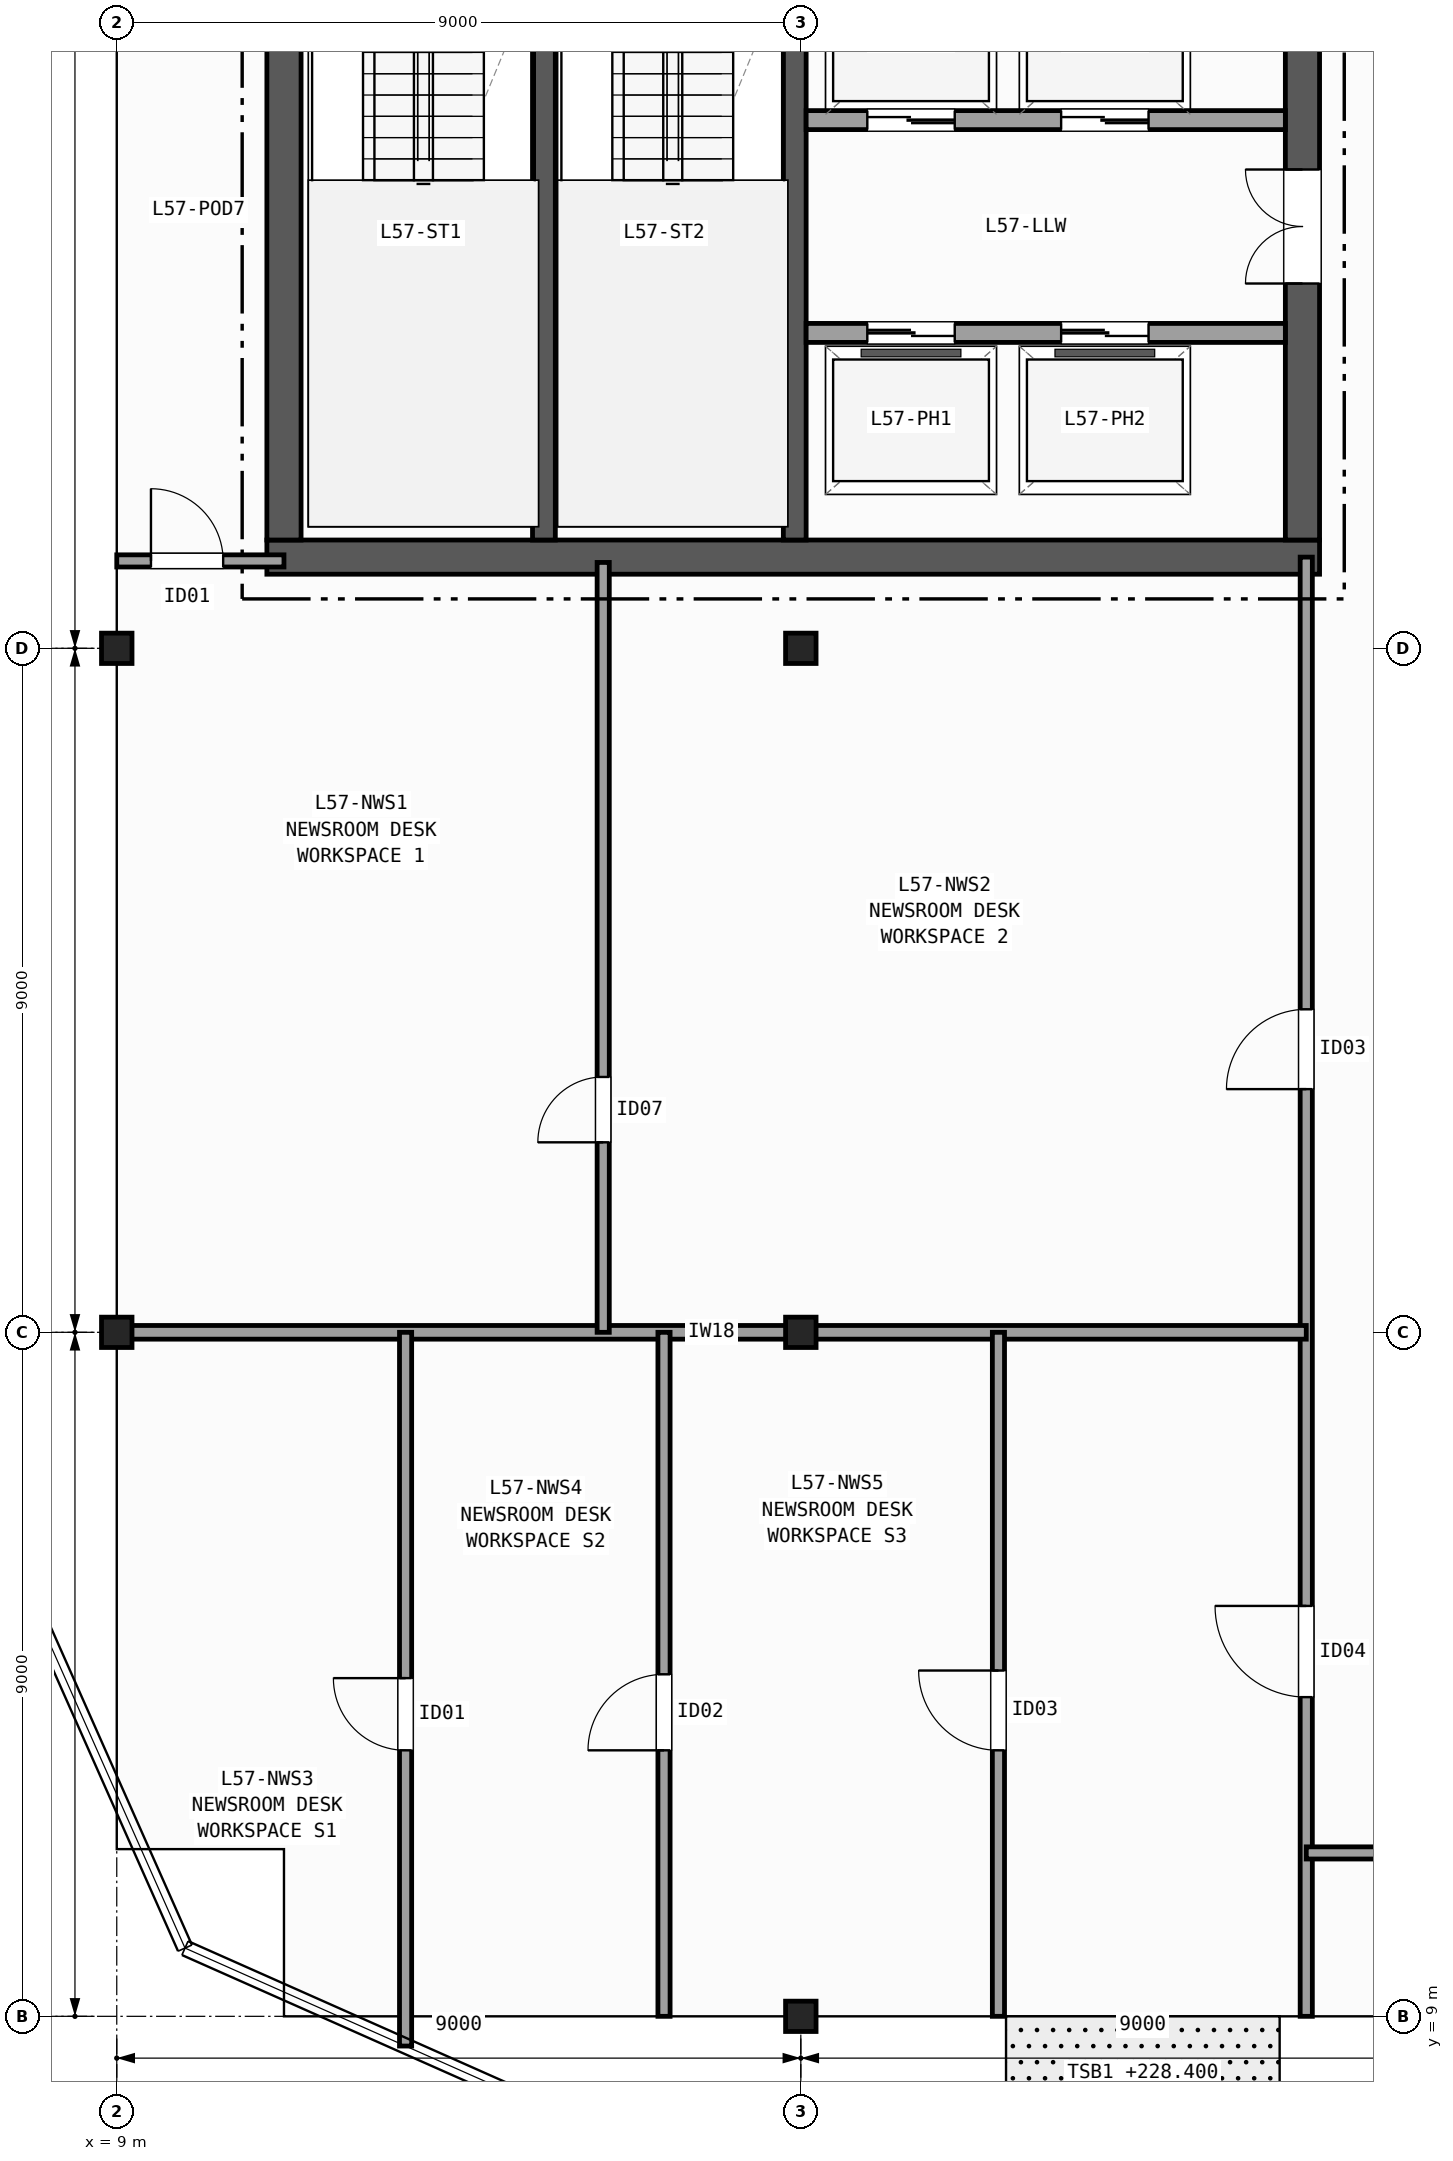
"""IFC4 building model, lengths in metres.
Left out: names, types, materials, properties, quantities, classifications, styles, units other than length and angle.
Written with IfcOpenShell. Run it as: python <this file> out.ifc"""

import sys

from ifc_helpers import new_model, si_unit, direction, frame, frame_2d, origin, origin_2d, place, context, subcontext, project, spatial, rectangle, i_section, extrude, element, fill, save


model = new_model("IFC4")
c1 = context("Model", 3, precision=1e-05, world=origin(), true_north=direction((0.0, 1.0)))
c2 = subcontext(c1, "Body", "Model", "MODEL_VIEW")
j1 = project(units=[si_unit("LENGTHUNIT", "METRE"), si_unit("PLANEANGLEUNIT", "RADIAN")], contexts=[c1])
p1 = place(None, origin())
s1 = spatial("IfcSite", under=j1, at=p1, CompositionType="ELEMENT")
p2 = place(p1, origin())
s2 = spatial("IfcBuilding", under=s1, at=p2, CompositionType="ELEMENT")
p3 = place(p2, frame((0.0, 0.0, 228.4)))
s3 = spatial("IfcBuildingStorey", under=s2, at=p3, CompositionType="ELEMENT", Elevation=228.4)
for number, where, z_axis, x_axis in (
    (1, (9.0, 18.0, 0.0), (0.0, 0.0, 1.0), (1.0, 0.0, 0.0)),
    (2, (9.0, 27.0, 0.0), (0.0, 0.0, 1.0), (1.0, 0.0, 0.0)),
    (3, (18.0, 9.0, 0.0), (0.0, 0.0, 1.0), (1.0, 0.0, 0.0)),
    (4, (18.0, 18.0, 0.0), (0.0, 0.0, 1.0), (1.0, 0.0, 0.0)),
    (5, (18.0, 27.0, 0.0), (0.0, 0.0, 1.0), (1.0, 0.0, 0.0)),
):
    element("IfcColumn", number, at=place(p3, frame(where, z_axis=z_axis, x_axis=x_axis)), inside=s3, PredefinedType="COLUMN", context=c2, shape_type="SweptSolid", body=[
        extrude(i_section(OverallWidth=0.401, OverallDepth=0.399, WebThickness=0.025, FlangeThickness=0.04, FilletRadius=0.015, at=origin_2d()), origin(), (0.0, 0.0, 1.0), 3.7),
    ])
p4 = place(p3, frame((10.975, 28.2, 0.0), z_axis=(0.0, 0.0, 1.0), x_axis=(1.0, 0.0, 0.0)))
e6 = element("IfcWall", 6, at=p4, inside=s3, PredefinedType="SHEAR", context=c2, shape_type="SweptSolid", body=[
    extrude(rectangle(XDim=13.85, YDim=0.45, at=frame_2d((6.925, 0.0))), origin(), (0.0, 0.0, 1.0), 3.42),
])
p5 = place(p3, frame((11.2, 42.175, 0.0), z_axis=(0.0, 0.0, 1.0), x_axis=(0.0, -1.0, 0.0)))
e7 = element("IfcWall", 7, at=p5, inside=s3, PredefinedType="SHEAR", context=c2, shape_type="SweptSolid", body=[
    extrude(rectangle(XDim=13.75, YDim=0.45, at=frame_2d((6.875, 0.0))), origin(), (0.0, 0.0, 1.0), 3.42),
])
p6 = place(p3, frame((24.6, 28.425, 0.0), z_axis=(0.0, 0.0, 1.0), x_axis=(0.0, 1.0, 0.0)))
e8 = element("IfcWall", 8, at=p6, inside=s3, PredefinedType="SHEAR", context=c2, shape_type="SweptSolid", body=[
    extrude(rectangle(XDim=13.75, YDim=0.45, at=frame_2d((6.875, 0.0))), origin(), (0.0, 0.0, 1.0), 3.42),
])
p7 = place(p6, frame((3.375, 0.0, 0.0)))
e9 = element("IfcOpeningElement", 9, at=p7, cuts=e8, PredefinedType="OPENING", context=c2, shape_type="SweptSolid", body=[
    extrude(rectangle(XDim=1.5, YDim=2.2, at=frame_2d((0.75, 1.1))), frame((0.0, 0.235, 0.0), z_axis=(0.0, -1.0, 0.0), x_axis=(1.0, 0.0, 0.0)), (0.0, 0.0, 1.0), 0.47),
])
p8 = place(p6, frame((9.975, 0.0, 0.0)))
e10 = element("IfcOpeningElement", 10, at=p8, cuts=e8, PredefinedType="OPENING", context=c2, shape_type="SweptSolid", body=[
    extrude(rectangle(XDim=0.9, YDim=2.1, at=frame_2d((0.45, 1.05))), frame((0.0, 0.235, 0.0), z_axis=(0.0, -1.0, 0.0), x_axis=(1.0, 0.0, 0.0)), (0.0, 0.0, 1.0), 0.47),
])
p9 = place(p3, frame((14.62, 28.425, 0.0), z_axis=(0.0, 0.0, 1.0), x_axis=(0.0, 1.0, 0.0)))
e11 = element("IfcWall", 11, at=p9, inside=s3, PredefinedType="SHEAR", context=c2, shape_type="SweptSolid", body=[
    extrude(rectangle(XDim=9.025, YDim=0.3, at=frame_2d((4.512, 0.0))), origin(), (0.0, 0.0, 1.0), 3.42),
])
p10 = place(p3, frame((17.92, 42.175, 0.0), z_axis=(0.0, 0.0, 1.0), x_axis=(0.0, -1.0, 0.0)))
e12 = element("IfcWall", 12, at=p10, inside=s3, PredefinedType="SHEAR", context=c2, shape_type="SweptSolid", body=[
    extrude(rectangle(XDim=13.75, YDim=0.3, at=frame_2d((6.875, 0.0))), origin(), (0.0, 0.0, 1.0), 3.42),
])
p11 = place(p10, frame((2.0, 0.0, 0.0)))
e13 = element("IfcOpeningElement", 13, at=p11, cuts=e12, PredefinedType="OPENING", context=c2, shape_type="SweptSolid", body=[
    extrude(rectangle(XDim=1.15, YDim=2.15, at=frame_2d((0.575, 1.075))), frame((0.0, 0.16, 0.0), z_axis=(0.0, -1.0, 0.0), x_axis=(1.0, 0.0, 0.0)), (0.0, 0.0, 1.0), 0.32),
])
p12 = place(p3, frame((18.07, 31.15, 0.0), z_axis=(0.0, 0.0, 1.0), x_axis=(1.0, 0.0, 0.0)))
e14 = element("IfcWall", 14, at=p12, inside=s3, PredefinedType="PARTITIONING", context=c2, shape_type="SweptSolid", body=[
    extrude(rectangle(XDim=6.305, YDim=0.25, at=frame_2d((3.152, 0.0))), origin(), (0.0, 0.0, 1.0), 3.42),
])
p13 = place(p12, frame((0.805, 0.0, 0.0)))
e15 = element("IfcOpeningElement", 15, at=p13, cuts=e14, PredefinedType="OPENING", context=c2, shape_type="SweptSolid", body=[
    extrude(rectangle(XDim=1.15, YDim=2.15, at=frame_2d((0.575, 1.075))), frame((0.0, 0.135, 0.0), z_axis=(0.0, -1.0, 0.0), x_axis=(1.0, 0.0, 0.0)), (0.0, 0.0, 1.0), 0.27),
])
p14 = place(p12, frame((3.355, 0.0, 0.0)))
e16 = element("IfcOpeningElement", 16, at=p14, cuts=e14, PredefinedType="OPENING", context=c2, shape_type="SweptSolid", body=[
    extrude(rectangle(XDim=1.15, YDim=2.15, at=frame_2d((0.575, 1.075))), frame((0.0, 0.135, 0.0), z_axis=(0.0, -1.0, 0.0), x_axis=(1.0, 0.0, 0.0)), (0.0, 0.0, 1.0), 0.27),
])
p15 = place(p3, frame((24.375, 33.95, 0.0), z_axis=(0.0, 0.0, 1.0), x_axis=(-1.0, 0.0, 0.0)))
e17 = element("IfcWall", 17, at=p15, inside=s3, PredefinedType="PARTITIONING", context=c2, shape_type="SweptSolid", body=[
    extrude(rectangle(XDim=6.305, YDim=0.25, at=frame_2d((3.152, 0.0))), origin(), (0.0, 0.0, 1.0), 3.42),
])
p16 = place(p15, frame((4.35, 0.0, 0.0)))
e18 = element("IfcOpeningElement", 18, at=p16, cuts=e17, PredefinedType="OPENING", context=c2, shape_type="SweptSolid", body=[
    extrude(rectangle(XDim=1.15, YDim=2.15, at=frame_2d((0.575, 1.075))), frame((0.0, 0.135, 0.0), z_axis=(0.0, -1.0, 0.0), x_axis=(1.0, 0.0, 0.0)), (0.0, 0.0, 1.0), 0.27),
])
p17 = place(p15, frame((1.8, 0.0, 0.0)))
e19 = element("IfcOpeningElement", 19, at=p17, cuts=e17, PredefinedType="OPENING", context=c2, shape_type="SweptSolid", body=[
    extrude(rectangle(XDim=1.15, YDim=2.15, at=frame_2d((0.575, 1.075))), frame((0.0, 0.135, 0.0), z_axis=(0.0, -1.0, 0.0), x_axis=(1.0, 0.0, 0.0)), (0.0, 0.0, 1.0), 0.27),
])
p18 = place(p3, frame((9.0, 28.15, 0.0), z_axis=(0.0, 0.0, 1.0), x_axis=(1.0, 0.0, 0.0)))
e20 = element("IfcWall", 20, at=p18, inside=s3, PredefinedType="PARTITIONING", context=c2, shape_type="SweptSolid", body=[
    extrude(rectangle(XDim=2.2, YDim=0.16, at=frame_2d((1.1, 0.0))), origin(), (0.0, 0.0, 1.0), 2.707),
])
p19 = place(p18, frame((0.45, 0.0, 0.0)))
e21 = element("IfcOpeningElement", 21, at=p19, cuts=e20, PredefinedType="OPENING", context=c2, shape_type="SweptSolid", body=[
    extrude(rectangle(XDim=0.95, YDim=2.1, at=frame_2d((0.475, 1.05))), frame((0.0, 0.09, 0.0), z_axis=(0.0, -1.0, 0.0), x_axis=(1.0, 0.0, 0.0)), (0.0, 0.0, 1.0), 0.18),
])
p20 = place(p3, frame((24.65, 9.0, 0.0), z_axis=(0.0, 0.0, 1.0), x_axis=(0.0, 1.0, 0.0)))
e22 = element("IfcWall", 22, at=p20, inside=s3, PredefinedType="PARTITIONING", context=c2, shape_type="SweptSolid", body=[
    extrude(rectangle(XDim=19.2, YDim=0.16, at=frame_2d((9.6, 0.0))), origin(), (0.0, 0.0, 1.0), 2.707),
])
p21 = place(p20, frame((12.2, 0.0, 0.0)))
e23 = element("IfcOpeningElement", 23, at=p21, cuts=e22, PredefinedType="OPENING", context=c2, shape_type="SweptSolid", body=[
    extrude(rectangle(XDim=1.05, YDim=2.15, at=frame_2d((0.525, 1.075))), frame((0.0, 0.09, 0.0), z_axis=(0.0, -1.0, 0.0), x_axis=(1.0, 0.0, 0.0)), (0.0, 0.0, 1.0), 0.18),
])
p22 = place(p20, frame((4.2, 0.0, 0.0)))
e24 = element("IfcOpeningElement", 24, at=p22, cuts=e22, PredefinedType="OPENING", context=c2, shape_type="SweptSolid", body=[
    extrude(rectangle(XDim=1.2, YDim=2.15, at=frame_2d((0.6, 1.075))), frame((0.0, 0.09, 0.0), z_axis=(0.0, -1.0, 0.0), x_axis=(1.0, 0.0, 0.0)), (0.0, 0.0, 1.0), 0.18),
])
p23 = place(p3, frame((9.0, 18.0, 0.0), z_axis=(0.0, 0.0, 1.0), x_axis=(1.0, 0.0, 0.0)))
e25 = element("IfcWall", 25, at=p23, inside=s3, PredefinedType="PARTITIONING", context=c2, shape_type="SweptSolid", body=[
    extrude(rectangle(XDim=15.65, YDim=0.18, at=frame_2d((7.825, 0.0))), origin(), (0.0, 0.0, 1.0), 2.707),
])
p24 = place(p3, frame((15.4, 18.0, 0.0), z_axis=(0.0, 0.0, 1.0), x_axis=(0.0, 1.0, 0.0)))
e26 = element("IfcWall", 26, at=p24, inside=s3, PredefinedType="PARTITIONING", context=c2, shape_type="SweptSolid", body=[
    extrude(rectangle(XDim=10.13, YDim=0.16, at=frame_2d((5.065, 0.0))), origin(), (0.0, 0.0, 1.0), 2.789),
])
p25 = place(p24, frame((2.5, 0.0, 0.0)))
e27 = element("IfcOpeningElement", 27, at=p25, cuts=e26, PredefinedType="OPENING", context=c2, shape_type="SweptSolid", body=[
    extrude(rectangle(XDim=0.86, YDim=2.05, at=frame_2d((0.43, 1.025))), frame((0.0, 0.09, 0.0), z_axis=(0.0, -1.0, 0.0), x_axis=(1.0, 0.0, 0.0)), (0.0, 0.0, 1.0), 0.18),
])
p26 = place(p3, frame((12.8, 8.609, 0.0), z_axis=(0.0, 0.0, 1.0), x_axis=(0.0, 1.0, 0.0)))
e28 = element("IfcWall", 28, at=p26, inside=s3, PredefinedType="PARTITIONING", context=c2, shape_type="SweptSolid", body=[
    extrude(rectangle(XDim=9.391, YDim=0.16, at=frame_2d((4.696, 0.0))), origin(), (0.0, 0.0, 1.0), 2.789),
])
p27 = place(p26, frame((3.891, 0.0, 0.0)))
e29 = element("IfcOpeningElement", 29, at=p27, cuts=e28, PredefinedType="OPENING", context=c2, shape_type="SweptSolid", body=[
    extrude(rectangle(XDim=0.95, YDim=2.1, at=frame_2d((0.475, 1.05))), frame((0.0, 0.09, 0.0), z_axis=(0.0, -1.0, 0.0), x_axis=(1.0, 0.0, 0.0)), (0.0, 0.0, 1.0), 0.18),
])
p28 = place(p3, frame((16.2, 9.0, 0.0), z_axis=(0.0, 0.0, 1.0), x_axis=(0.0, 1.0, 0.0)))
e30 = element("IfcWall", 30, at=p28, inside=s3, PredefinedType="PARTITIONING", context=c2, shape_type="SweptSolid", body=[
    extrude(rectangle(XDim=9.0, YDim=0.16, at=frame_2d((4.5, 0.0))), origin(), (0.0, 0.0, 1.0), 2.789),
])
p29 = place(p28, frame((3.5, 0.0, 0.0)))
e31 = element("IfcOpeningElement", 31, at=p29, cuts=e30, PredefinedType="OPENING", context=c2, shape_type="SweptSolid", body=[
    extrude(rectangle(XDim=1.0, YDim=2.1, at=frame_2d((0.5, 1.05))), frame((0.0, 0.09, 0.0), z_axis=(0.0, -1.0, 0.0), x_axis=(1.0, 0.0, 0.0)), (0.0, 0.0, 1.0), 0.18),
])
p30 = place(p3, frame((20.6, 9.0, 0.0), z_axis=(0.0, 0.0, 1.0), x_axis=(0.0, 1.0, 0.0)))
e32 = element("IfcWall", 32, at=p30, inside=s3, PredefinedType="PARTITIONING", context=c2, shape_type="SweptSolid", body=[
    extrude(rectangle(XDim=9.0, YDim=0.16, at=frame_2d((4.5, 0.0))), origin(), (0.0, 0.0, 1.0), 2.707),
])
p31 = place(p30, frame((3.5, 0.0, 0.0)))
e33 = element("IfcOpeningElement", 33, at=p31, cuts=e32, PredefinedType="OPENING", context=c2, shape_type="SweptSolid", body=[
    extrude(rectangle(XDim=1.05, YDim=2.15, at=frame_2d((0.525, 1.075))), frame((0.0, 0.09, 0.0), z_axis=(0.0, -1.0, 0.0), x_axis=(1.0, 0.0, 0.0)), (0.0, 0.0, 1.0), 0.18),
])
p32 = place(p3, frame((24.65, 11.15, 0.0), z_axis=(0.0, 0.0, 1.0), x_axis=(1.0, 0.0, 0.0)))
e34 = element("IfcWall", 34, at=p32, inside=s3, PredefinedType="PARTITIONING", context=c2, shape_type="SweptSolid", body=[
    extrude(rectangle(XDim=4.75, YDim=0.16, at=frame_2d((2.375, 0.0))), origin(), (0.0, 0.0, 1.0), 2.792),
])
p33 = place(p32, frame((1.2, 0.0, 0.0)))
e35 = element("IfcOpeningElement", 35, at=p33, cuts=e34, PredefinedType="OPENING", context=c2, shape_type="SweptSolid", body=[
    extrude(rectangle(XDim=1.2, YDim=2.15, at=frame_2d((0.6, 1.075))), frame((0.0, 0.09, 0.0), z_axis=(0.0, -1.0, 0.0), x_axis=(1.0, 0.0, 0.0)), (0.0, 0.0, 1.0), 0.18),
])
p34 = place(p7, origin())
e36 = element("IfcDoor", 36, at=p34, inside=s3, OperationType="DOUBLE_DOOR_SINGLE_SWING", PredefinedType="DOOR", context=c2, shape_type="SweptSolid", body=[
    extrude(rectangle(XDim=1.5, YDim=2.2, at=frame_2d((0.75, 1.1))), frame((0.0, 0.025, 0.0), z_axis=(0.0, -1.0, 0.0), x_axis=(1.0, 0.0, 0.0)), (0.0, 0.0, 1.0), 0.05),
])
fill(e9, e36)
p35 = place(p13, origin())
e37 = element("IfcDoor", 37, at=p35, inside=s3, OperationType="DOUBLE_DOOR_SLIDING", PredefinedType="DOOR", context=c2, shape_type="SweptSolid", body=[
    extrude(rectangle(XDim=1.15, YDim=2.15, at=frame_2d((0.575, 1.075))), frame((0.0, 0.025, 0.0), z_axis=(0.0, -1.0, 0.0), x_axis=(1.0, 0.0, 0.0)), (0.0, 0.0, 1.0), 0.05),
])
fill(e15, e37)
p36 = place(p14, origin())
e38 = element("IfcDoor", 38, at=p36, inside=s3, OperationType="DOUBLE_DOOR_SLIDING", PredefinedType="DOOR", context=c2, shape_type="SweptSolid", body=[
    extrude(rectangle(XDim=1.15, YDim=2.15, at=frame_2d((0.575, 1.075))), frame((0.0, 0.025, 0.0), z_axis=(0.0, -1.0, 0.0), x_axis=(1.0, 0.0, 0.0)), (0.0, 0.0, 1.0), 0.05),
])
fill(e16, e38)
p37 = place(p16, origin())
e39 = element("IfcDoor", 39, at=p37, inside=s3, OperationType="DOUBLE_DOOR_SLIDING", PredefinedType="DOOR", context=c2, shape_type="SweptSolid", body=[
    extrude(rectangle(XDim=1.15, YDim=2.15, at=frame_2d((0.575, 1.075))), frame((0.0, 0.025, 0.0), z_axis=(0.0, -1.0, 0.0), x_axis=(1.0, 0.0, 0.0)), (0.0, 0.0, 1.0), 0.05),
])
fill(e18, e39)
p38 = place(p17, origin())
e40 = element("IfcDoor", 40, at=p38, inside=s3, OperationType="DOUBLE_DOOR_SLIDING", PredefinedType="DOOR", context=c2, shape_type="SweptSolid", body=[
    extrude(rectangle(XDim=1.15, YDim=2.15, at=frame_2d((0.575, 1.075))), frame((0.0, 0.025, 0.0), z_axis=(0.0, -1.0, 0.0), x_axis=(1.0, 0.0, 0.0)), (0.0, 0.0, 1.0), 0.05),
])
fill(e19, e40)
p39 = place(p19, origin())
e41 = element("IfcDoor", 41, at=p39, inside=s3, OperationType="SINGLE_SWING_LEFT", PredefinedType="DOOR", context=c2, shape_type="SweptSolid", body=[
    extrude(rectangle(XDim=0.95, YDim=2.1, at=frame_2d((0.475, 1.05))), frame((0.0, 0.025, 0.0), z_axis=(0.0, -1.0, 0.0), x_axis=(1.0, 0.0, 0.0)), (0.0, 0.0, 1.0), 0.05),
])
fill(e21, e41)
p40 = place(p21, origin())
e42 = element("IfcDoor", 42, at=p40, inside=s3, OperationType="SINGLE_SWING_LEFT", PredefinedType="DOOR", context=c2, shape_type="SweptSolid", body=[
    extrude(rectangle(XDim=1.05, YDim=2.15, at=frame_2d((0.525, 1.075))), frame((0.0, 0.025, 0.0), z_axis=(0.0, -1.0, 0.0), x_axis=(1.0, 0.0, 0.0)), (0.0, 0.0, 1.0), 0.05),
])
fill(e23, e42)
p41 = place(p22, origin())
e43 = element("IfcDoor", 43, at=p41, inside=s3, OperationType="SINGLE_SWING_RIGHT", PredefinedType="DOOR", context=c2, shape_type="SweptSolid", body=[
    extrude(rectangle(XDim=1.2, YDim=2.15, at=frame_2d((0.6, 1.075))), frame((0.0, 0.025, 0.0), z_axis=(0.0, -1.0, 0.0), x_axis=(1.0, 0.0, 0.0)), (0.0, 0.0, 1.0), 0.05),
])
fill(e24, e43)
p42 = place(p25, origin())
e44 = element("IfcDoor", 44, at=p42, inside=s3, OperationType="SINGLE_SWING_LEFT", PredefinedType="DOOR", context=c2, shape_type="SweptSolid", body=[
    extrude(rectangle(XDim=0.86, YDim=2.05, at=frame_2d((0.43, 1.025))), frame((0.0, 0.025, 0.0), z_axis=(0.0, -1.0, 0.0), x_axis=(1.0, 0.0, 0.0)), (0.0, 0.0, 1.0), 0.05),
])
fill(e27, e44)
p43 = place(p27, origin())
e45 = element("IfcDoor", 45, at=p43, inside=s3, OperationType="SINGLE_SWING_RIGHT", PredefinedType="DOOR", context=c2, shape_type="SweptSolid", body=[
    extrude(rectangle(XDim=0.95, YDim=2.1, at=frame_2d((0.475, 1.05))), frame((0.0, 0.025, 0.0), z_axis=(0.0, -1.0, 0.0), x_axis=(1.0, 0.0, 0.0)), (0.0, 0.0, 1.0), 0.05),
])
fill(e29, e45)
p44 = place(p29, origin())
e46 = element("IfcDoor", 46, at=p44, inside=s3, OperationType="SINGLE_SWING_LEFT", PredefinedType="DOOR", context=c2, shape_type="SweptSolid", body=[
    extrude(rectangle(XDim=1.0, YDim=2.1, at=frame_2d((0.5, 1.05))), frame((0.0, 0.025, 0.0), z_axis=(0.0, -1.0, 0.0), x_axis=(1.0, 0.0, 0.0)), (0.0, 0.0, 1.0), 0.05),
])
fill(e31, e46)
p45 = place(p31, origin())
e47 = element("IfcDoor", 47, at=p45, inside=s3, OperationType="SINGLE_SWING_RIGHT", PredefinedType="DOOR", context=c2, shape_type="SweptSolid", body=[
    extrude(rectangle(XDim=1.05, YDim=2.15, at=frame_2d((0.525, 1.075))), frame((0.0, 0.025, 0.0), z_axis=(0.0, -1.0, 0.0), x_axis=(1.0, 0.0, 0.0)), (0.0, 0.0, 1.0), 0.05),
])
fill(e33, e47)
save(model, sys.argv[1])
